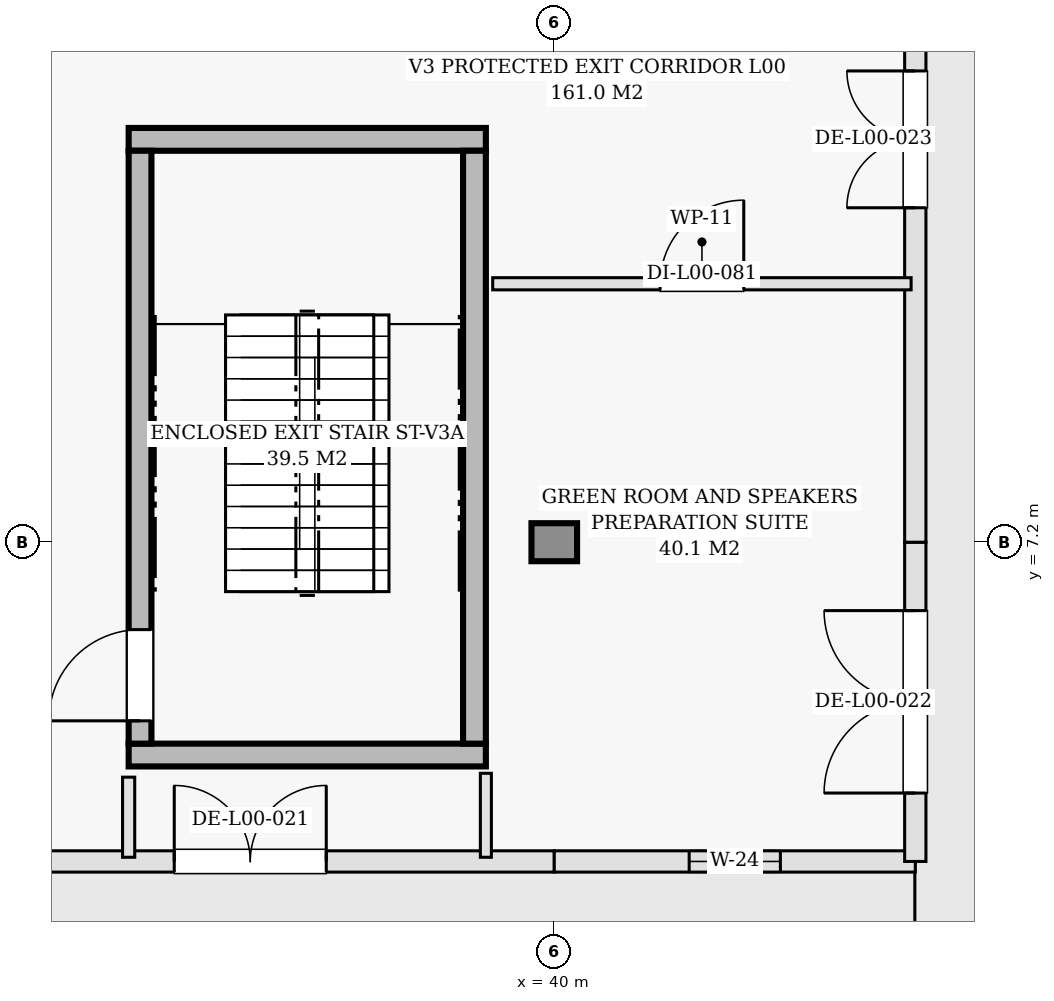
"""IFC4 building model, lengths in metres.
Left out: names, types, materials, properties, quantities, classifications, styles, units other than length and angle.
Written with IfcOpenShell. Run it as: python <this file> out.ifc"""

import sys

from ifc_helpers import new_model, si_unit, direction, frame, frame_2d, origin, origin_2d, place, context, subcontext, project, spatial, rectangle, extrude, element, fill, save


model = new_model("IFC4")
c1 = context("Model", 3, precision=1e-05, world=origin(), true_north=direction((0.0, 1.0)))
c2 = subcontext(c1, "Body", "Model", "MODEL_VIEW")
j1 = project(units=[si_unit("LENGTHUNIT", "METRE"), si_unit("PLANEANGLEUNIT", "RADIAN")], contexts=[c1])
p1 = place(None, origin())
s1 = spatial("IfcSite", under=j1, at=p1, CompositionType="ELEMENT")
p2 = place(p1, origin())
s2 = spatial("IfcBuilding", under=s1, at=p2, CompositionType="ELEMENT")
p3 = place(p2, origin())
s3 = spatial("IfcBuildingStorey", under=s2, at=p3, CompositionType="ELEMENT", Elevation=0.0)
p4 = place(p3, frame((40.0, 7.2, 0.0), z_axis=(0.0, 0.0, 1.0), x_axis=(1.0, 0.0, 0.0)))
e1 = element("IfcColumn", 1, at=p4, inside=s3, PredefinedType="COLUMN", context=c2, shape_type="SweptSolid", body=[
    extrude(rectangle(XDim=0.5, YDim=0.5, at=origin_2d()), origin(), (0.0, 0.0, 1.0), 4.8),
])
p5 = place(p3, frame((32.0, 3.0, 0.0), z_axis=(0.0, 0.0, 1.0), x_axis=(1.0, 0.0, 0.0)))
e2 = element("IfcWall", 2, at=p5, inside=s3, PredefinedType="SOLIDWALL", context=c2, shape_type="SweptSolid", body=[
    extrude(rectangle(XDim=8.0, YDim=0.28, at=frame_2d((4.0, 0.0))), origin(), (0.0, 0.0, 1.0), 3.955),
])
p6 = place(p5, frame((3.0, 0.0, 0.0)))
e3 = element("IfcOpeningElement", 3, at=p6, cuts=e2, PredefinedType="OPENING", context=c2, shape_type="SweptSolid", body=[
    extrude(rectangle(XDim=2.0, YDim=2.3, at=frame_2d((1.0, 1.15))), frame((0.0, 0.15, 0.0), z_axis=(0.0, -1.0, 0.0), x_axis=(1.0, 0.0, 0.0)), (0.0, 0.0, 1.0), 0.3),
])
p7 = place(p3, frame((40.0, 3.0, 0.0), z_axis=(0.0, 0.0, 1.0), x_axis=(1.0, 0.0, 0.0)))
e4 = element("IfcWall", 4, at=p7, inside=s3, PredefinedType="SOLIDWALL", context=c2, shape_type="SweptSolid", body=[
    extrude(rectangle(XDim=4.75, YDim=0.28, at=frame_2d((2.375, 0.0))), origin(), (0.0, 0.0, 1.0), 3.955),
])
p8 = place(p7, frame((1.775, 0.0, 0.9)))
e5 = element("IfcOpeningElement", 5, at=p8, cuts=e4, PredefinedType="OPENING", context=c2, shape_type="SweptSolid", body=[
    extrude(rectangle(XDim=1.2, YDim=2.2, at=frame_2d((0.6, 1.1))), frame((0.0, 0.15, 0.0), z_axis=(0.0, -1.0, 0.0), x_axis=(1.0, 0.0, 0.0)), (0.0, 0.0, 1.0), 0.3),
])
p9 = place(p3, frame((44.75, 3.0, 0.0), z_axis=(0.0, 0.0, 1.0), x_axis=(0.0, 1.0, 0.0)))
e6 = element("IfcWall", 6, at=p9, inside=s3, PredefinedType="SOLIDWALL", context=c2, shape_type="SweptSolid", body=[
    extrude(rectangle(XDim=4.2, YDim=0.28, at=frame_2d((2.1, 0.0))), origin(), (0.0, 0.0, 1.0), 3.905),
])
p10 = place(p9, frame((0.9, 0.0, 0.0)))
e7 = element("IfcOpeningElement", 7, at=p10, cuts=e6, PredefinedType="OPENING", context=c2, shape_type="SweptSolid", body=[
    extrude(rectangle(XDim=2.4, YDim=2.4, at=frame_2d((1.2, 1.2))), frame((0.0, 0.15, 0.0), z_axis=(0.0, -1.0, 0.0), x_axis=(1.0, 0.0, 0.0)), (0.0, 0.0, 1.0), 0.3),
])
p11 = place(p3, frame((44.75, 7.2, 0.0), z_axis=(0.0, 0.0, 1.0), x_axis=(0.0, 1.0, 0.0)))
e8 = element("IfcWall", 8, at=p11, inside=s3, PredefinedType="SOLIDWALL", context=c2, shape_type="SweptSolid", body=[
    extrude(rectangle(XDim=7.2, YDim=0.28, at=frame_2d((3.6, 0.0))), origin(), (0.0, 0.0, 1.0), 3.905),
])
p12 = place(p11, frame((4.4, 0.0, 0.0)))
e9 = element("IfcOpeningElement", 9, at=p12, cuts=e8, PredefinedType="OPENING", context=c2, shape_type="SweptSolid", body=[
    extrude(rectangle(XDim=1.8, YDim=2.2, at=frame_2d((0.9, 1.1))), frame((0.0, 0.15, 0.0), z_axis=(0.0, -1.0, 0.0), x_axis=(1.0, 0.0, 0.0)), (0.0, 0.0, 1.0), 0.3),
])
for number, where, z_axis, x_axis in (
    (10, (34.4, 4.4, 0.0), (0.0, 0.0, 1.0), (1.0, 0.0, 0.0)),
    (11, (34.4, 12.5, 0.0), (0.0, 0.0, 1.0), (1.0, 0.0, 0.0)),
):
    element("IfcWall", number, at=place(p3, frame(where, z_axis=z_axis, x_axis=x_axis)), inside=s3, PredefinedType="SHEAR", context=c2, shape_type="SweptSolid", body=[
        extrude(rectangle(XDim=4.7, YDim=0.3, at=frame_2d((2.35, 0.0))), origin(), (0.0, 0.0, 1.0), 4.52),
    ])
p13 = place(p3, frame((34.55, 4.55, 0.0), z_axis=(0.0, 0.0, 1.0), x_axis=(0.0, 1.0, 0.0)))
e12 = element("IfcWall", 12, at=p13, inside=s3, PredefinedType="SHEAR", context=c2, shape_type="SweptSolid", body=[
    extrude(rectangle(XDim=7.8, YDim=0.3, at=frame_2d((3.9, 0.0))), origin(), (0.0, 0.0, 1.0), 4.52),
])
p14 = place(p13, frame((0.3, 0.0, 0.0)))
e13 = element("IfcOpeningElement", 13, at=p14, cuts=e12, PredefinedType="OPENING", context=c2, shape_type="SweptSolid", body=[
    extrude(rectangle(XDim=1.2, YDim=2.15, at=frame_2d((0.6, 1.075))), frame((0.0, 0.16, 0.0), z_axis=(0.0, -1.0, 0.0), x_axis=(1.0, 0.0, 0.0)), (0.0, 0.0, 1.0), 0.32),
])
p15 = place(p3, frame((38.95, 4.55, 0.0), z_axis=(0.0, 0.0, 1.0), x_axis=(0.0, 1.0, 0.0)))
e14 = element("IfcWall", 14, at=p15, inside=s3, PredefinedType="SHEAR", context=c2, shape_type="SweptSolid", body=[
    extrude(rectangle(XDim=7.8, YDim=0.3, at=frame_2d((3.9, 0.0))), origin(), (0.0, 0.0, 1.0), 4.52),
])
p16 = place(p3, frame((39.19, 10.6, 0.0), z_axis=(0.0, 0.0, 1.0), x_axis=(1.0, 0.0, 0.0)))
e15 = element("IfcWall", 15, at=p16, inside=s3, PredefinedType="PARTITIONING", context=c2, shape_type="SweptSolid", body=[
    extrude(rectangle(XDim=5.505, YDim=0.16, at=frame_2d((2.752, 0.0))), origin(), (0.0, 0.0, 1.0), 3.955),
])
p17 = place(p16, frame((2.203, 0.0, 0.0)))
e16 = element("IfcOpeningElement", 16, at=p17, cuts=e15, PredefinedType="OPENING", context=c2, shape_type="SweptSolid", body=[
    extrude(rectangle(XDim=1.1, YDim=2.15, at=frame_2d((0.55, 1.075))), frame((0.0, 0.09, 0.0), z_axis=(0.0, -1.0, 0.0), x_axis=(1.0, 0.0, 0.0)), (0.0, 0.0, 1.0), 0.18),
])
p18 = place(p3, frame((39.1, 3.055, 0.0), z_axis=(0.0, 0.0, 1.0), x_axis=(0.0, 1.0, 0.0)))
e17 = element("IfcWall", 17, at=p18, inside=s3, PredefinedType="PARTITIONING", context=c2, shape_type="SweptSolid", body=[
    extrude(rectangle(XDim=1.105, YDim=0.145, at=frame_2d((0.552, 0.0))), origin(), (0.0, 0.0, 1.0), 4.52),
])
p19 = place(p3, frame((34.4, 3.055, 0.0), z_axis=(0.0, 0.0, 1.0), x_axis=(0.0, 1.0, 0.0)))
e18 = element("IfcWall", 18, at=p19, inside=s3, PredefinedType="PARTITIONING", context=c2, shape_type="SweptSolid", body=[
    extrude(rectangle(XDim=1.054, YDim=0.16, at=frame_2d((0.527, 0.0))), origin(), (0.0, 0.0, 1.0), 4.52),
])
p20 = place(p6, origin())
e19 = element("IfcDoor", 19, at=p20, inside=s3, OperationType="DOUBLE_DOOR_SINGLE_SWING", PredefinedType="DOOR", context=c2, shape_type="SweptSolid", body=[
    extrude(rectangle(XDim=2.0, YDim=2.3, at=frame_2d((1.0, 1.15))), frame((0.0, 0.025, 0.0), z_axis=(0.0, -1.0, 0.0), x_axis=(1.0, 0.0, 0.0)), (0.0, 0.0, 1.0), 0.05),
])
fill(e3, e19)
p21 = place(p8, origin())
e20 = element("IfcWindow", 20, at=p21, inside=s3, PartitioningType="DOUBLE_PANEL_VERTICAL", PredefinedType="WINDOW", context=c2, shape_type="SweptSolid", body=[
    extrude(rectangle(XDim=1.2, YDim=2.2, at=frame_2d((0.6, 1.1))), frame((0.0, 0.03, 0.0), z_axis=(0.0, -1.0, 0.0), x_axis=(1.0, 0.0, 0.0)), (0.0, 0.0, 1.0), 0.06),
])
fill(e5, e20)
p22 = place(p10, origin())
e21 = element("IfcDoor", 21, at=p22, inside=s3, OperationType="DOUBLE_DOOR_SINGLE_SWING", PredefinedType="DOOR", context=c2, shape_type="SweptSolid", body=[
    extrude(rectangle(XDim=2.4, YDim=2.4, at=frame_2d((1.2, 1.2))), frame((0.0, 0.025, 0.0), z_axis=(0.0, -1.0, 0.0), x_axis=(1.0, 0.0, 0.0)), (0.0, 0.0, 1.0), 0.05),
])
fill(e7, e21)
p23 = place(p12, frame((1.8, 0.0, 0.0), z_axis=(0.0, 0.0, 1.0), x_axis=(-1.0, 0.0, 0.0)))
e22 = element("IfcDoor", 22, at=p23, inside=s3, OperationType="DOUBLE_DOOR_SINGLE_SWING", PredefinedType="DOOR", context=c2, shape_type="SweptSolid", body=[
    extrude(rectangle(XDim=1.8, YDim=2.2, at=frame_2d((0.9, 1.1))), frame((0.0, 0.025, 0.0), z_axis=(0.0, -1.0, 0.0), x_axis=(1.0, 0.0, 0.0)), (0.0, 0.0, 1.0), 0.05),
])
fill(e9, e22)
p24 = place(p14, origin())
e23 = element("IfcDoor", 23, at=p24, inside=s3, OperationType="SINGLE_SWING_LEFT", PredefinedType="DOOR", context=c2, shape_type="SweptSolid", body=[
    extrude(rectangle(XDim=1.2, YDim=2.15, at=frame_2d((0.6, 1.075))), frame((0.0, 0.025, 0.0), z_axis=(0.0, -1.0, 0.0), x_axis=(1.0, 0.0, 0.0)), (0.0, 0.0, 1.0), 0.05),
])
fill(e13, e23)
p25 = place(p17, origin())
e24 = element("IfcDoor", 24, at=p25, inside=s3, OperationType="SINGLE_SWING_RIGHT", PredefinedType="DOOR", context=c2, shape_type="SweptSolid", body=[
    extrude(rectangle(XDim=1.1, YDim=2.15, at=frame_2d((0.55, 1.075))), frame((0.0, 0.025, 0.0), z_axis=(0.0, -1.0, 0.0), x_axis=(1.0, 0.0, 0.0)), (0.0, 0.0, 1.0), 0.05),
])
fill(e16, e24)
save(model, sys.argv[1])
